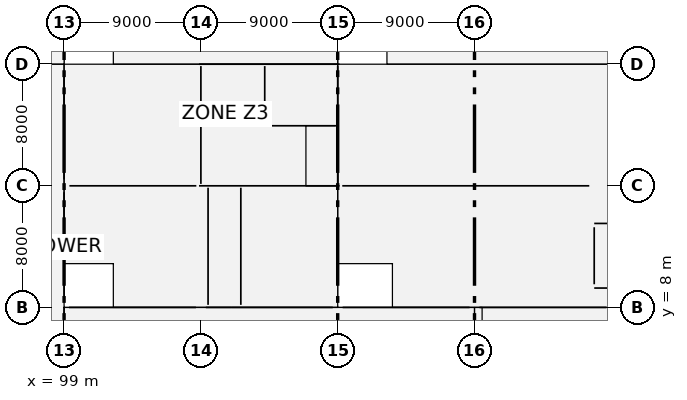
"""IFC4 building model, lengths in metres.
Left out: names, types, materials, properties, quantities, classifications, styles, units other than length and angle.
Written with IfcOpenShell. Run it as: python <this file> out.ifc"""

import sys

from ifc_helpers import new_model, si_unit, direction, frame, frame_2d, origin, origin_2d, place, context, subcontext, project, spatial, rectangle, hollow_rectangle, extrude, element, fill, save


model = new_model("IFC4")
c1 = context("Model", 3, precision=1e-05, world=origin(), true_north=direction((0.0, 1.0)))
c2 = subcontext(c1, "Body", "Model", "MODEL_VIEW")
j1 = project(units=[si_unit("LENGTHUNIT", "METRE"), si_unit("PLANEANGLEUNIT", "RADIAN")], contexts=[c1])
p1 = place(None, origin())
s1 = spatial("IfcSite", under=j1, at=p1, CompositionType="ELEMENT")
p2 = place(p1, origin())
s2 = spatial("IfcBuilding", under=s1, at=p2, CompositionType="ELEMENT")
p3 = place(p2, origin())
s3 = spatial("IfcBuildingStorey", under=s2, at=p3, CompositionType="ELEMENT", Elevation=0.0)
for number, where, z_axis, x_axis in (
    (1, (99.0, 8.0, -0.5), (0.0, 0.0, 1.0), (1.0, 0.0, 0.0)),
    (2, (99.0, 16.0, -0.5), (0.0, 0.0, 1.0), (1.0, 0.0, 0.0)),
    (3, (99.0, 24.0, -0.5), (0.0, 0.0, 1.0), (1.0, 0.0, 0.0)),
    (4, (108.0, 8.0, -0.5), (0.0, 0.0, 1.0), (1.0, 0.0, 0.0)),
    (5, (108.0, 16.0, -0.5), (0.0, 0.0, 1.0), (1.0, 0.0, 0.0)),
    (6, (108.0, 24.0, -0.5), (0.0, 0.0, 1.0), (1.0, 0.0, 0.0)),
    (7, (117.0, 8.0, -0.5), (0.0, 0.0, 1.0), (1.0, 0.0, 0.0)),
    (8, (117.0, 16.0, -0.5), (0.0, 0.0, 1.0), (1.0, 0.0, 0.0)),
    (9, (117.0, 24.0, -0.5), (0.0, 0.0, 1.0), (1.0, 0.0, 0.0)),
    (10, (126.0, 8.0, -0.5), (0.0, 0.0, 1.0), (1.0, 0.0, 0.0)),
    (11, (126.0, 16.0, -0.5), (0.0, 0.0, 1.0), (1.0, 0.0, 0.0)),
    (12, (126.0, 24.0, -0.5), (0.0, 0.0, 1.0), (1.0, 0.0, 0.0)),
    (13, (135.0, 8.0, -0.5), (0.0, 0.0, 1.0), (1.0, 0.0, 0.0)),
    (14, (135.0, 16.0, -0.5), (0.0, 0.0, 1.0), (1.0, 0.0, 0.0)),
    (15, (135.0, 24.0, -0.5), (0.0, 0.0, 1.0), (1.0, 0.0, 0.0)),
):
    element("IfcColumn", number, at=place(p3, frame(where, z_axis=z_axis, x_axis=x_axis)), inside=s3, PredefinedType="COLUMN", context=c2, shape_type="SweptSolid", body=[
        extrude(rectangle(XDim=0.65, YDim=0.65, at=origin_2d()), origin(), (0.0, 0.0, 1.0), 6.8),
    ])
p4 = place(p3, frame((99.325, 8.0, 0.0), z_axis=(0.0, 0.0, 1.0), x_axis=(1.0, 0.0, 0.0)))
e16 = element("IfcWall", 16, at=p4, inside=s3, PredefinedType="SOLIDWALL", context=c2, shape_type="SweptSolid", body=[
    extrude(rectangle(XDim=8.35, YDim=0.3, at=frame_2d((4.175, 0.0))), origin(), (0.0, 0.0, 1.0), 0.45),
])
p5 = place(p3, frame((110.0, 8.0, 0.0), z_axis=(0.0, 0.0, 1.0), x_axis=(-1.0, 0.0, 0.0)))
e17 = element("IfcWall", 17, at=p5, inside=s3, PredefinedType="SOLIDWALL", context=c2, shape_type="SweptSolid", body=[
    extrude(rectangle(XDim=1.675, YDim=0.34, at=frame_2d((0.837, 0.0))), origin(), (0.0, 0.0, 1.0), 5.13),
])
p6 = place(p5, frame((0.1, 0.0, 0.0)))
e18 = element("IfcOpeningElement", 18, at=p6, cuts=e17, PredefinedType="OPENING", context=c2, shape_type="SweptSolid", body=[
    extrude(rectangle(XDim=1.2, YDim=2.25, at=frame_2d((0.6, 1.125))), frame((0.0, 0.18, 0.0), z_axis=(0.0, -1.0, 0.0), x_axis=(1.0, 0.0, 0.0)), (0.0, 0.0, 1.0), 0.36),
])
p7 = place(p3, frame((117.325, 8.0, 0.0), z_axis=(0.0, 0.0, 1.0), x_axis=(1.0, 0.0, 0.0)))
e19 = element("IfcWall", 19, at=p7, inside=s3, PredefinedType="SOLIDWALL", context=c2, shape_type="SweptSolid", body=[
    extrude(rectangle(XDim=8.35, YDim=0.34, at=frame_2d((4.175, 0.0))), origin(), (0.0, 0.0, 1.0), 5.13),
])
p8 = place(p7, frame((3.175, 0.0, 0.0)))
e20 = element("IfcOpeningElement", 20, at=p8, cuts=e19, PredefinedType="OPENING", context=c2, shape_type="SweptSolid", body=[
    extrude(rectangle(XDim=2.0, YDim=2.75, at=frame_2d((1.0, 1.375))), frame((0.0, 0.18, 0.0), z_axis=(0.0, -1.0, 0.0), x_axis=(1.0, 0.0, 0.0)), (0.0, 0.0, 1.0), 0.36),
])
p9 = place(p3, frame((126.325, 8.0, 0.0), z_axis=(0.0, 0.0, 1.0), x_axis=(1.0, 0.0, 0.0)))
e21 = element("IfcWall", 21, at=p9, inside=s3, PredefinedType="SOLIDWALL", context=c2, shape_type="SweptSolid", body=[
    extrude(rectangle(XDim=8.35, YDim=0.3, at=frame_2d((4.175, 0.0))), origin(), (0.0, 0.0, 1.0), 0.45),
])
p10 = place(p3, frame((117.125, 16.0, -0.5), z_axis=(0.0, 0.0, 1.0), x_axis=(-1.0, 0.0, 0.0)))
e22 = element("IfcWall", 22, at=p10, inside=s3, PredefinedType="SOLIDWALL", context=c2, shape_type="SweptSolid", body=[
    extrude(rectangle(XDim=9.25, YDim=0.25, at=frame_2d((4.625, 0.0))), origin(), (0.0, 0.0, 1.0), 6.8),
])
p11 = place(p10, frame((7.225, 0.0, 0.5)))
e23 = element("IfcOpeningElement", 23, at=p11, cuts=e22, PredefinedType="OPENING", context=c2, shape_type="SweptSolid", body=[
    extrude(rectangle(XDim=1.2, YDim=2.2, at=frame_2d((0.6, 1.1))), frame((0.0, 0.135, 0.0), z_axis=(0.0, -1.0, 0.0), x_axis=(1.0, 0.0, 0.0)), (0.0, 0.0, 1.0), 0.27),
])
p12 = place(p3, frame((107.875, 24.0, -0.5), z_axis=(0.0, 0.0, 1.0), x_axis=(1.0, 0.0, 0.0)))
e24 = element("IfcWall", 24, at=p12, inside=s3, PredefinedType="SOLIDWALL", context=c2, shape_type="SweptSolid", body=[
    extrude(rectangle(XDim=9.25, YDim=0.25, at=frame_2d((4.625, 0.0))), origin(), (0.0, 0.0, 1.0), 6.8),
])
p13 = place(p12, frame((5.775, 0.0, 0.5)))
e25 = element("IfcOpeningElement", 25, at=p13, cuts=e24, PredefinedType="OPENING", context=c2, shape_type="SweptSolid", body=[
    extrude(rectangle(XDim=1.6, YDim=2.2, at=frame_2d((0.8, 1.1))), frame((0.0, 0.135, 0.0), z_axis=(0.0, -1.0, 0.0), x_axis=(1.0, 0.0, 0.0)), (0.0, 0.0, 1.0), 0.27),
])
p14 = place(p3, frame((108.0, 16.125, -0.5), z_axis=(0.0, 0.0, 1.0), x_axis=(0.0, 1.0, 0.0)))
e26 = element("IfcWall", 26, at=p14, inside=s3, PredefinedType="SOLIDWALL", context=c2, shape_type="SweptSolid", body=[
    extrude(rectangle(XDim=7.75, YDim=0.25, at=frame_2d((3.875, 0.0))), origin(), (0.0, 0.0, 1.0), 6.8),
])
p15 = place(p14, frame((1.15, 0.0, 0.5)))
e27 = element("IfcOpeningElement", 27, at=p15, cuts=e26, PredefinedType="OPENING", context=c2, shape_type="SweptSolid", body=[
    extrude(rectangle(XDim=1.2, YDim=2.2, at=frame_2d((0.6, 1.1))), frame((0.0, 0.135, 0.0), z_axis=(0.0, -1.0, 0.0), x_axis=(1.0, 0.0, 0.0)), (0.0, 0.0, 1.0), 0.27),
])
p16 = place(p3, frame((117.0, 16.125, -0.5), z_axis=(0.0, 0.0, 1.0), x_axis=(0.0, 1.0, 0.0)))
e28 = element("IfcWall", 28, at=p16, inside=s3, PredefinedType="SOLIDWALL", context=c2, shape_type="SweptSolid", body=[
    extrude(rectangle(XDim=7.75, YDim=0.25, at=frame_2d((3.875, 0.0))), origin(), (0.0, 0.0, 1.0), 6.8),
])
p17 = place(p3, frame((108.125, 19.95, -0.5), z_axis=(0.0, 0.0, 1.0), x_axis=(1.0, 0.0, 0.0)))
e29 = element("IfcWall", 29, at=p17, inside=s3, PredefinedType="SOLIDWALL", context=c2, shape_type="SweptSolid", body=[
    extrude(rectangle(XDim=8.75, YDim=0.25, at=frame_2d((4.375, 0.0))), origin(), (0.0, 0.0, 1.0), 6.8),
])
p18 = place(p3, frame((112.2, 20.075, -0.5), z_axis=(0.0, 0.0, 1.0), x_axis=(0.0, 1.0, 0.0)))
e30 = element("IfcWall", 30, at=p18, inside=s3, PredefinedType="SOLIDWALL", context=c2, shape_type="SweptSolid", body=[
    extrude(rectangle(XDim=3.8, YDim=0.25, at=frame_2d((1.9, 0.0))), origin(), (0.0, 0.0, 1.0), 6.8),
])
p19 = place(p18, frame((1.35, 0.0, 0.5)))
e31 = element("IfcOpeningElement", 31, at=p19, cuts=e30, PredefinedType="OPENING", context=c2, shape_type="SweptSolid", body=[
    extrude(rectangle(XDim=1.1, YDim=2.2, at=frame_2d((0.55, 1.1))), frame((0.0, 0.135, 0.0), z_axis=(0.0, -1.0, 0.0), x_axis=(1.0, 0.0, 0.0)), (0.0, 0.0, 1.0), 0.27),
])
for number, where, z_axis, x_axis in (
    (32, (133.875, 9.275, -0.5), (0.0, 0.0, 1.0), (1.0, 0.0, 0.0)),
    (33, (133.875, 13.525, -0.5), (0.0, 0.0, 1.0), (1.0, 0.0, 0.0)),
):
    element("IfcWall", number, at=place(p3, frame(where, z_axis=z_axis, x_axis=x_axis)), inside=s3, PredefinedType="SOLIDWALL", context=c2, shape_type="SweptSolid", body=[
        extrude(rectangle(XDim=8.85, YDim=0.25, at=frame_2d((4.425, 0.0))), origin(), (0.0, 0.0, 1.0), 6.8),
    ])
p20 = place(p3, frame((133.875, 9.525, -0.5), z_axis=(0.0, 0.0, 1.0), x_axis=(0.0, 1.0, 0.0)))
e34 = element("IfcWall", 34, at=p20, inside=s3, PredefinedType="SOLIDWALL", context=c2, shape_type="SweptSolid", body=[
    extrude(rectangle(XDim=3.75, YDim=0.25, at=frame_2d((1.875, 0.0))), origin(), (0.0, 0.0, 1.0), 6.8),
])
p21 = place(p20, frame((1.1, 0.0, 0.5)))
e35 = element("IfcOpeningElement", 35, at=p21, cuts=e34, PredefinedType="OPENING", context=c2, shape_type="SweptSolid", body=[
    extrude(rectangle(XDim=1.2, YDim=2.2, at=frame_2d((0.6, 1.1))), frame((0.0, 0.135, 0.0), z_axis=(0.0, -1.0, 0.0), x_axis=(1.0, 0.0, 0.0)), (0.0, 0.0, 1.0), 0.27),
])
for number, where, z_axis, x_axis in (
    (36, (133.875, 17.275, -0.5), (0.0, 0.0, 1.0), (1.0, 0.0, 0.0)),
    (37, (133.875, 21.525, -0.5), (0.0, 0.0, 1.0), (1.0, 0.0, 0.0)),
):
    element("IfcColumn", number, at=place(p3, frame(where, z_axis=z_axis, x_axis=x_axis)), inside=s3, PredefinedType="COLUMN", context=c2, shape_type="SweptSolid", body=[
        extrude(hollow_rectangle(XDim=0.2, YDim=0.2, WallThickness=0.01, InnerFilletRadius=0.01, OuterFilletRadius=0.02, at=origin_2d()), origin(), (0.0, 0.0, 1.0), 6.8),
    ])
p22 = place(p3, frame((99.0, 8.42, 0.0), z_axis=(0.0, 0.0, 1.0), x_axis=(0.0, 1.0, 0.0)))
e38 = element("IfcWall", 38, at=p22, inside=s3, PredefinedType="STANDARD", context=c2, shape_type="SweptSolid", body=[
    extrude(rectangle(XDim=7.16, YDim=0.255, at=frame_2d((3.58, 0.0))), origin(), (0.0, 0.0, 1.0), 5.35),
])
p23 = place(p22, frame((2.78, 0.0, 0.0)))
e39 = element("IfcOpeningElement", 39, at=p23, cuts=e38, PredefinedType="OPENING", context=c2, shape_type="SweptSolid", body=[
    extrude(rectangle(XDim=1.6, YDim=2.2, at=frame_2d((0.8, 1.1))), frame((0.0, 0.137, 0.0), z_axis=(0.0, -1.0, 0.0), x_axis=(1.0, 0.0, 0.0)), (0.0, 0.0, 1.0), 0.275),
])
p24 = place(p3, frame((99.0, 16.42, 0.0), z_axis=(0.0, 0.0, 1.0), x_axis=(0.0, 1.0, 0.0)))
e40 = element("IfcWall", 40, at=p24, inside=s3, PredefinedType="STANDARD", context=c2, shape_type="SweptSolid", body=[
    extrude(rectangle(XDim=7.16, YDim=0.255, at=frame_2d((3.58, 0.0))), origin(), (0.0, 0.0, 1.0), 5.35),
])
p25 = place(p24, frame((2.78, 0.0, 0.0)))
e41 = element("IfcOpeningElement", 41, at=p25, cuts=e40, PredefinedType="OPENING", context=c2, shape_type="SweptSolid", body=[
    extrude(rectangle(XDim=1.6, YDim=2.2, at=frame_2d((0.8, 1.1))), frame((0.0, 0.137, 0.0), z_axis=(0.0, -1.0, 0.0), x_axis=(1.0, 0.0, 0.0)), (0.0, 0.0, 1.0), 0.275),
])
p26 = place(p3, frame((99.35, 16.0, 0.0), z_axis=(0.0, 0.0, 1.0), x_axis=(1.0, 0.0, 0.0)))
e42 = element("IfcWall", 42, at=p26, inside=s3, PredefinedType="PARTITIONING", context=c2, shape_type="SweptSolid", body=[
    extrude(rectangle(XDim=8.35, YDim=0.14, at=frame_2d((4.175, 0.0))), origin(), (0.0, 0.0, 1.0), 5.25),
])
p27 = place(p26, frame((3.25, 0.0, 0.0)))
e43 = element("IfcOpeningElement", 43, at=p27, cuts=e42, PredefinedType="OPENING", context=c2, shape_type="SweptSolid", body=[
    extrude(rectangle(XDim=1.85, YDim=2.25, at=frame_2d((0.925, 1.125))), frame((0.0, 0.08, 0.0), z_axis=(0.0, -1.0, 0.0), x_axis=(1.0, 0.0, 0.0)), (0.0, 0.0, 1.0), 0.16),
])
p28 = place(p3, frame((117.3, 16.0, 0.0), z_axis=(0.0, 0.0, 1.0), x_axis=(1.0, 0.0, 0.0)))
e44 = element("IfcWall", 44, at=p28, inside=s3, PredefinedType="STANDARD", context=c2, shape_type="SweptSolid", body=[
    extrude(rectangle(XDim=16.25, YDim=0.195, at=frame_2d((8.125, 0.0))), origin(), (0.0, 0.0, 1.0), 5.13),
])
p29 = place(p28, frame((3.5, 0.0, 0.0)))
e45 = element("IfcOpeningElement", 45, at=p29, cuts=e44, PredefinedType="OPENING", context=c2, shape_type="SweptSolid", body=[
    extrude(rectangle(XDim=1.7, YDim=2.4, at=frame_2d((0.85, 1.2))), frame((0.0, 0.107, 0.0), z_axis=(0.0, -1.0, 0.0), x_axis=(1.0, 0.0, 0.0)), (0.0, 0.0, 1.0), 0.215),
])
for number, where, z_axis, x_axis in (
    (46, (108.472, 8.17, 0.0), (0.0, 0.0, 1.0), (0.0, 1.0, 0.0)),
    (47, (110.627, 8.17, 0.0), (0.0, 0.0, 1.0), (0.0, 1.0, 0.0)),
):
    element("IfcWall", number, at=place(p3, frame(where, z_axis=z_axis, x_axis=x_axis)), inside=s3, PredefinedType="STANDARD", context=c2, shape_type="SweptSolid", body=[
        extrude(rectangle(XDim=7.705, YDim=0.255, at=frame_2d((3.853, 0.0))), origin(), (0.0, 0.0, 1.0), 5.95),
    ])
p30 = place(p3, frame((110.0, 8.0, 0.0), z_axis=(0.0, 0.0, 1.0), x_axis=(1.0, 0.0, 0.0)))
e48 = element("IfcWall", 48, at=p30, inside=s3, PredefinedType="SOLIDWALL", context=c2, shape_type="SweptSolid", body=[
    extrude(rectangle(XDim=6.675, YDim=0.34, at=frame_2d((3.337, 0.0))), origin(), (0.0, 0.0, 1.0), 5.13),
])
p31 = place(p30, frame((0.805, 0.0, 0.85)))
e49 = element("IfcOpeningElement", 49, at=p31, cuts=e48, PredefinedType="OPENING", context=c2, shape_type="SweptSolid", body=[
    extrude(rectangle(XDim=1.8, YDim=3.15, at=frame_2d((0.9, 1.575))), frame((0.0, 0.18, 0.0), z_axis=(0.0, -1.0, 0.0), x_axis=(1.0, 0.0, 0.0)), (0.0, 0.0, 1.0), 0.36),
])
p32 = place(p30, frame((2.992, 0.0, 0.85)))
e50 = element("IfcOpeningElement", 50, at=p32, cuts=e48, PredefinedType="OPENING", context=c2, shape_type="SweptSolid", body=[
    extrude(rectangle(XDim=1.8, YDim=3.15, at=frame_2d((0.9, 1.575))), frame((0.0, 0.18, 0.0), z_axis=(0.0, -1.0, 0.0), x_axis=(1.0, 0.0, 0.0)), (0.0, 0.0, 1.0), 0.36),
])
p33 = place(p3, frame((99.0, 4.02, 0.0), z_axis=(0.0, 0.0, 1.0), x_axis=(0.0, 1.0, 0.0)))
e51 = element("IfcWall", 51, at=p33, inside=s3, PredefinedType="SOLIDWALL", context=c2, shape_type="SweptSolid", body=[
    extrude(rectangle(XDim=3.655, YDim=0.34, at=frame_2d((1.828, 0.0))), origin(), (0.0, 0.0, 1.0), 4.575),
])
p34 = place(p33, frame((0.305, 0.0, 0.85)))
e52 = element("IfcOpeningElement", 52, at=p34, cuts=e51, PredefinedType="OPENING", context=c2, shape_type="SweptSolid", body=[
    extrude(rectangle(XDim=1.8, YDim=3.15, at=frame_2d((0.9, 1.575))), frame((0.0, 0.18, 0.0), z_axis=(0.0, -1.0, 0.0), x_axis=(1.0, 0.0, 0.0)), (0.0, 0.0, 1.0), 0.36),
])
p35 = place(p31, origin())
e53 = element("IfcWindow", 53, at=p35, inside=s3, PartitioningType="DOUBLE_PANEL_VERTICAL", PredefinedType="WINDOW", context=c2, shape_type="SweptSolid", body=[
    extrude(rectangle(XDim=1.8, YDim=3.15, at=frame_2d((0.9, 1.575))), frame((0.0, 0.03, 0.0), z_axis=(0.0, -1.0, 0.0), x_axis=(1.0, 0.0, 0.0)), (0.0, 0.0, 1.0), 0.06),
])
fill(e49, e53)
p36 = place(p32, origin())
e54 = element("IfcWindow", 54, at=p36, inside=s3, PartitioningType="DOUBLE_PANEL_VERTICAL", PredefinedType="WINDOW", context=c2, shape_type="SweptSolid", body=[
    extrude(rectangle(XDim=1.8, YDim=3.15, at=frame_2d((0.9, 1.575))), frame((0.0, 0.03, 0.0), z_axis=(0.0, -1.0, 0.0), x_axis=(1.0, 0.0, 0.0)), (0.0, 0.0, 1.0), 0.06),
])
fill(e50, e54)
p37 = place(p8, origin())
e55 = element("IfcDoor", 55, at=p37, inside=s3, OperationType="DOUBLE_DOOR_SINGLE_SWING", PredefinedType="DOOR", context=c2, shape_type="SweptSolid", body=[
    extrude(rectangle(XDim=2.0, YDim=2.75, at=frame_2d((1.0, 1.375))), frame((0.0, 0.025, 0.0), z_axis=(0.0, -1.0, 0.0), x_axis=(1.0, 0.0, 0.0)), (0.0, 0.0, 1.0), 0.05),
])
fill(e20, e55)
p38 = place(p19, origin())
e56 = element("IfcDoor", 56, at=p38, inside=s3, OperationType="SLIDING_TO_LEFT", PredefinedType="DOOR", context=c2, shape_type="SweptSolid", body=[
    extrude(rectangle(XDim=1.1, YDim=2.2, at=frame_2d((0.55, 1.1))), frame((0.0, 0.025, 0.0), z_axis=(0.0, -1.0, 0.0), x_axis=(1.0, 0.0, 0.0)), (0.0, 0.0, 1.0), 0.05),
])
fill(e31, e56)
p39 = place(p15, origin())
e57 = element("IfcDoor", 57, at=p39, inside=s3, OperationType="SINGLE_SWING_LEFT", PredefinedType="DOOR", context=c2, shape_type="SweptSolid", body=[
    extrude(rectangle(XDim=1.2, YDim=2.2, at=frame_2d((0.6, 1.1))), frame((0.0, 0.025, 0.0), z_axis=(0.0, -1.0, 0.0), x_axis=(1.0, 0.0, 0.0)), (0.0, 0.0, 1.0), 0.05),
])
fill(e27, e57)
p40 = place(p13, origin())
e58 = element("IfcDoor", 58, at=p40, inside=s3, OperationType="SINGLE_SWING_RIGHT", PredefinedType="DOOR", context=c2, shape_type="SweptSolid", body=[
    extrude(rectangle(XDim=1.6, YDim=2.2, at=frame_2d((0.8, 1.1))), frame((0.0, 0.025, 0.0), z_axis=(0.0, -1.0, 0.0), x_axis=(1.0, 0.0, 0.0)), (0.0, 0.0, 1.0), 0.05),
])
fill(e25, e58)
p41 = place(p21, origin())
e59 = element("IfcDoor", 59, at=p41, inside=s3, OperationType="SINGLE_SWING_RIGHT", PredefinedType="DOOR", context=c2, shape_type="SweptSolid", body=[
    extrude(rectangle(XDim=1.2, YDim=2.2, at=frame_2d((0.6, 1.1))), frame((0.0, 0.025, 0.0), z_axis=(0.0, -1.0, 0.0), x_axis=(1.0, 0.0, 0.0)), (0.0, 0.0, 1.0), 0.05),
])
fill(e35, e59)
p42 = place(p23, origin())
e60 = element("IfcDoor", 60, at=p42, inside=s3, OperationType="DOUBLE_DOOR_SINGLE_SWING", PredefinedType="DOOR", context=c2, shape_type="SweptSolid", body=[
    extrude(rectangle(XDim=1.6, YDim=2.2, at=frame_2d((0.8, 1.1))), frame((0.0, 0.025, 0.0), z_axis=(0.0, -1.0, 0.0), x_axis=(1.0, 0.0, 0.0)), (0.0, 0.0, 1.0), 0.05),
])
fill(e39, e60)
p43 = place(p25, origin())
e61 = element("IfcDoor", 61, at=p43, inside=s3, OperationType="DOUBLE_DOOR_SINGLE_SWING", PredefinedType="DOOR", context=c2, shape_type="SweptSolid", body=[
    extrude(rectangle(XDim=1.6, YDim=2.2, at=frame_2d((0.8, 1.1))), frame((0.0, 0.025, 0.0), z_axis=(0.0, -1.0, 0.0), x_axis=(1.0, 0.0, 0.0)), (0.0, 0.0, 1.0), 0.05),
])
fill(e41, e61)
p44 = place(p27, origin())
e62 = element("IfcDoor", 62, at=p44, inside=s3, OperationType="DOUBLE_DOOR_SINGLE_SWING", PredefinedType="DOOR", context=c2, shape_type="SweptSolid", body=[
    extrude(rectangle(XDim=1.85, YDim=2.25, at=frame_2d((0.925, 1.125))), frame((0.0, 0.025, 0.0), z_axis=(0.0, -1.0, 0.0), x_axis=(1.0, 0.0, 0.0)), (0.0, 0.0, 1.0), 0.05),
])
fill(e43, e62)
p45 = place(p29, origin())
e63 = element("IfcDoor", 63, at=p45, inside=s3, OperationType="SLIDING_TO_LEFT", PredefinedType="DOOR", context=c2, shape_type="SweptSolid", body=[
    extrude(rectangle(XDim=1.7, YDim=2.4, at=frame_2d((0.85, 1.2))), frame((0.0, 0.025, 0.0), z_axis=(0.0, -1.0, 0.0), x_axis=(1.0, 0.0, 0.0)), (0.0, 0.0, 1.0), 0.05),
])
fill(e45, e63)
p46 = place(p11, origin())
e64 = element("IfcDoor", 64, at=p46, inside=s3, OperationType="SINGLE_SWING_LEFT", PredefinedType="DOOR", context=c2, shape_type="SweptSolid", body=[
    extrude(rectangle(XDim=1.2, YDim=2.2, at=frame_2d((0.6, 1.1))), frame((0.0, 0.025, 0.0), z_axis=(0.0, -1.0, 0.0), x_axis=(1.0, 0.0, 0.0)), (0.0, 0.0, 1.0), 0.05),
])
fill(e23, e64)
p47 = place(p6, origin())
e65 = element("IfcDoor", 65, at=p47, inside=s3, OperationType="SINGLE_SWING_LEFT", PredefinedType="DOOR", context=c2, shape_type="SweptSolid", body=[
    extrude(rectangle(XDim=1.2, YDim=2.25, at=frame_2d((0.6, 1.125))), frame((0.0, 0.025, 0.0), z_axis=(0.0, -1.0, 0.0), x_axis=(1.0, 0.0, 0.0)), (0.0, 0.0, 1.0), 0.05),
])
fill(e18, e65)
save(model, sys.argv[1])
